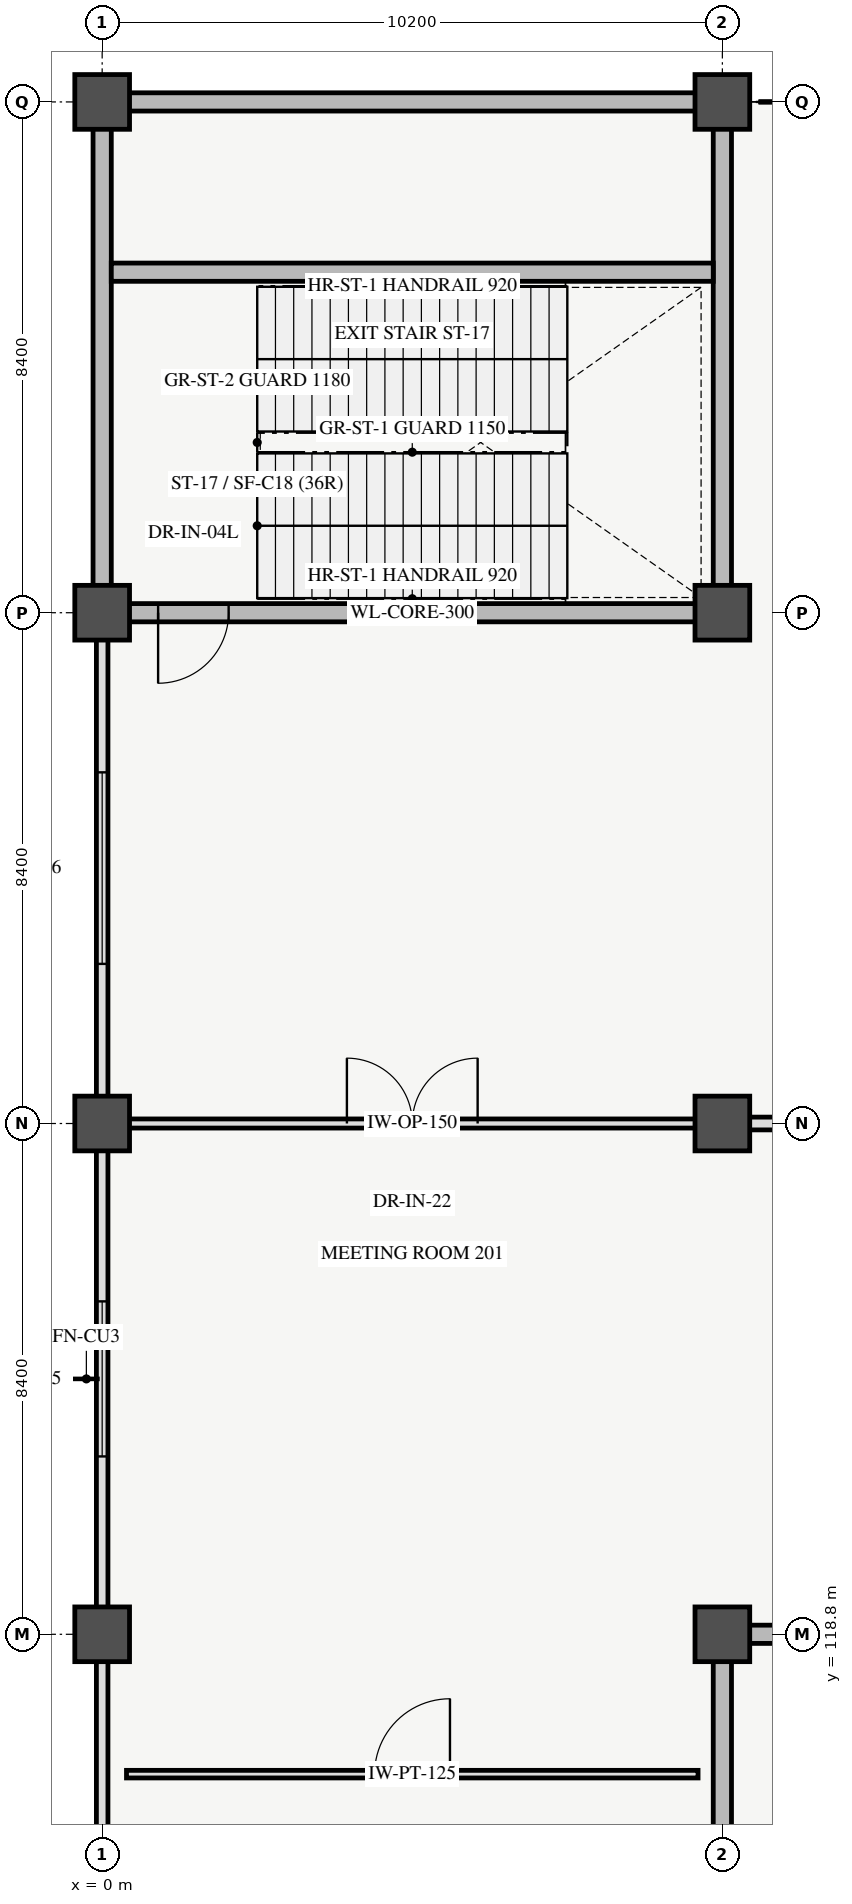
"""IFC4 building model, lengths in metres.
Left out: names, types, materials, properties, quantities, classifications, styles, units other than length and angle.
Written with IfcOpenShell. Run it as: python <this file> out.ifc"""

import sys

from ifc_helpers import new_model, si_unit, direction, frame, frame_2d, origin, origin_2d, place, context, subcontext, project, spatial, rectangle, extrude, element, fill, save


model = new_model("IFC4")
c1 = context("Model", 3, precision=1e-05, world=origin(), true_north=direction((0.0, 1.0)))
c2 = subcontext(c1, "Body", "Model", "MODEL_VIEW")
j1 = project(units=[si_unit("LENGTHUNIT", "METRE"), si_unit("PLANEANGLEUNIT", "RADIAN")], contexts=[c1])
p1 = place(None, origin())
s1 = spatial("IfcSite", under=j1, at=p1, CompositionType="ELEMENT")
p2 = place(p1, origin())
s2 = spatial("IfcBuilding", under=s1, at=p2, CompositionType="ELEMENT")
p3 = place(p2, frame((0.0, 0.0, 5.4)))
s3 = spatial("IfcBuildingStorey", under=s2, at=p3, CompositionType="ELEMENT", Elevation=5.4)
for number, where, z_axis, x_axis in (
    (1, (0.0, 118.8, 0.0), (0.0, 0.0, 1.0), (1.0, 0.0, 0.0)),
    (2, (0.0, 127.2, 0.0), (0.0, 0.0, 1.0), (1.0, 0.0, 0.0)),
    (3, (0.0, 135.6, 0.0), (0.0, 0.0, 1.0), (1.0, 0.0, 0.0)),
    (4, (0.0, 144.0, 0.0), (0.0, 0.0, 1.0), (1.0, 0.0, 0.0)),
    (5, (10.2, 118.8, 0.0), (0.0, 0.0, 1.0), (1.0, 0.0, 0.0)),
    (6, (10.2, 127.2, 0.0), (0.0, 0.0, 1.0), (1.0, 0.0, 0.0)),
    (7, (10.2, 135.6, 0.0), (0.0, 0.0, 1.0), (1.0, 0.0, 0.0)),
    (8, (10.2, 144.0, 0.0), (0.0, 0.0, 1.0), (1.0, 0.0, 0.0)),
):
    element("IfcColumn", number, at=place(p3, frame(where, z_axis=z_axis, x_axis=x_axis)), inside=s3, PredefinedType="COLUMN", context=c2, shape_type="SweptSolid", body=[
        extrude(rectangle(XDim=0.9, YDim=0.9, at=origin_2d()), origin(), (0.0, 0.0, 1.0), 5.4),
    ])
p4 = place(p3, frame((10.2, 118.8, 0.0), z_axis=(0.0, 0.0, 1.0), x_axis=(1.0, 0.0, 0.0)))
e9 = element("IfcWall", 9, at=p4, inside=s3, PredefinedType="SHEAR", context=c2, shape_type="SweptSolid", body=[
    extrude(rectangle(XDim=10.2, YDim=0.3, at=frame_2d((5.1, 0.0))), origin(), (0.0, 0.0, 1.0), 5.4),
])
p5 = place(p4, frame((1.2, 0.0, 0.0)))
e10 = element("IfcOpeningElement", 10, at=p5, cuts=e9, PredefinedType="OPENING", context=c2, shape_type="SweptSolid", body=[
    extrude(rectangle(XDim=1.16, YDim=2.2, at=frame_2d((0.58, 1.1))), frame((0.0, 0.16, 0.0), z_axis=(0.0, -1.0, 0.0), x_axis=(1.0, 0.0, 0.0)), (0.0, 0.0, 1.0), 0.32),
])
p6 = place(p4, frame((7.4, 0.0, 0.0)))
e11 = element("IfcOpeningElement", 11, at=p6, cuts=e9, PredefinedType="OPENING", context=c2, shape_type="SweptSolid", body=[
    extrude(rectangle(XDim=1.1, YDim=2.2, at=frame_2d((0.55, 1.1))), frame((0.0, 0.16, 0.0), z_axis=(0.0, -1.0, 0.0), x_axis=(1.0, 0.0, 0.0)), (0.0, 0.0, 1.0), 0.32),
])
p7 = place(p3, frame((10.2, 109.2, 0.0), z_axis=(0.0, 0.0, 1.0), x_axis=(0.0, 1.0, 0.0)))
e12 = element("IfcWall", 12, at=p7, inside=s3, PredefinedType="SHEAR", context=c2, shape_type="SweptSolid", body=[
    extrude(rectangle(XDim=9.6, YDim=0.3, at=frame_2d((4.8, 0.0))), origin(), (0.0, 0.0, 1.0), 5.4),
])
p8 = place(p3, frame((0.0, 109.44, 0.0), z_axis=(0.0, 0.0, 1.0), x_axis=(0.0, 1.0, 0.0)))
e13 = element("IfcWall", 13, at=p8, inside=s3, PredefinedType="STANDARD", context=c2, shape_type="SweptSolid", body=[
    extrude(rectangle(XDim=9.12, YDim=0.19, at=frame_2d((4.56, 0.0))), origin(), (0.0, 0.0, 1.0), 4.32),
])
p9 = place(p8, frame((3.585, 0.0, 0.9)))
e14 = element("IfcOpeningElement", 14, at=p9, cuts=e13, PredefinedType="OPENING", context=c2, shape_type="SweptSolid", body=[
    extrude(rectangle(XDim=1.95, YDim=1.65, at=frame_2d((0.975, 0.825))), frame((0.0, 0.105, 0.0), z_axis=(0.0, -1.0, 0.0), x_axis=(1.0, 0.0, 0.0)), (0.0, 0.0, 1.0), 0.21),
])
p10 = place(p3, frame((0.0, 119.04, 0.0), z_axis=(0.0, 0.0, 1.0), x_axis=(0.0, 1.0, 0.0)))
e15 = element("IfcWall", 15, at=p10, inside=s3, PredefinedType="STANDARD", context=c2, shape_type="SweptSolid", body=[
    extrude(rectangle(XDim=7.92, YDim=0.19, at=frame_2d((3.96, 0.0))), origin(), (0.0, 0.0, 1.0), 4.32),
])
p11 = place(p10, frame((2.685, 0.0, 0.9)))
e16 = element("IfcOpeningElement", 16, at=p11, cuts=e15, PredefinedType="OPENING", context=c2, shape_type="SweptSolid", body=[
    extrude(rectangle(XDim=2.55, YDim=2.25, at=frame_2d((1.275, 1.125))), frame((0.0, 0.105, 0.0), z_axis=(0.0, -1.0, 0.0), x_axis=(1.0, 0.0, 0.0)), (0.0, 0.0, 1.0), 0.21),
])
p12 = place(p3, frame((0.0, 127.44, 0.0), z_axis=(0.0, 0.0, 1.0), x_axis=(0.0, 1.0, 0.0)))
e17 = element("IfcWall", 17, at=p12, inside=s3, PredefinedType="STANDARD", context=c2, shape_type="SweptSolid", body=[
    extrude(rectangle(XDim=7.92, YDim=0.19, at=frame_2d((3.96, 0.0))), origin(), (0.0, 0.0, 1.0), 4.32),
])
p13 = place(p12, frame((2.385, 0.0, 0.9)))
e18 = element("IfcOpeningElement", 18, at=p13, cuts=e17, PredefinedType="OPENING", context=c2, shape_type="SweptSolid", body=[
    extrude(rectangle(XDim=3.15, YDim=2.25, at=frame_2d((1.575, 1.125))), frame((0.0, 0.105, 0.0), z_axis=(0.0, -1.0, 0.0), x_axis=(1.0, 0.0, 0.0)), (0.0, 0.0, 1.0), 0.21),
])
p14 = place(p3, frame((0.0, 135.6, 0.0), z_axis=(0.0, 0.0, 1.0), x_axis=(1.0, 0.0, 0.0)))
e19 = element("IfcWall", 19, at=p14, inside=s3, PredefinedType="SHEAR", context=c2, shape_type="SweptSolid", body=[
    extrude(rectangle(XDim=10.2, YDim=0.3, at=frame_2d((5.1, 0.0))), origin(), (0.0, 0.0, 1.0), 5.4),
])
p15 = place(p14, frame((0.92, 0.0, 0.0)))
e20 = element("IfcOpeningElement", 20, at=p15, cuts=e19, PredefinedType="OPENING", context=c2, shape_type="SweptSolid", body=[
    extrude(rectangle(XDim=1.16, YDim=2.2, at=frame_2d((0.58, 1.1))), frame((0.0, 0.16, 0.0), z_axis=(0.0, -1.0, 0.0), x_axis=(1.0, 0.0, 0.0)), (0.0, 0.0, 1.0), 0.32),
])
p16 = place(p3, frame((0.0, 144.0, 0.0), z_axis=(0.0, 0.0, 1.0), x_axis=(1.0, 0.0, 0.0)))
e21 = element("IfcWall", 21, at=p16, inside=s3, PredefinedType="SHEAR", context=c2, shape_type="SweptSolid", body=[
    extrude(rectangle(XDim=10.2, YDim=0.3, at=frame_2d((5.1, 0.0))), origin(), (0.0, 0.0, 1.0), 5.4),
])
for number, where, z_axis, x_axis in (
    (22, (0.0, 135.6, 0.0), (0.0, 0.0, 1.0), (0.0, 1.0, 0.0)),
    (23, (10.2, 135.6, 0.0), (0.0, 0.0, 1.0), (0.0, 1.0, 0.0)),
):
    element("IfcWall", number, at=place(p3, frame(where, z_axis=z_axis, x_axis=x_axis)), inside=s3, PredefinedType="SHEAR", context=c2, shape_type="SweptSolid", body=[
        extrude(rectangle(XDim=8.4, YDim=0.3, at=frame_2d((4.2, 0.0))), origin(), (0.0, 0.0, 1.0), 5.4),
    ])
p17 = place(p3, frame((0.15, 141.2, 0.0), z_axis=(0.0, 0.0, 1.0), x_axis=(1.0, 0.0, 0.0)))
e24 = element("IfcWall", 24, at=p17, inside=s3, PredefinedType="SHEAR", context=c2, shape_type="SweptSolid", body=[
    extrude(rectangle(XDim=9.9, YDim=0.3, at=frame_2d((4.95, 0.0))), origin(), (0.0, 0.0, 1.0), 5.4),
])
p18 = place(p3, frame((0.4, 127.2, 0.0), z_axis=(0.0, 0.0, 1.0), x_axis=(1.0, 0.0, 0.0)))
e25 = element("IfcWall", 25, at=p18, inside=s3, PredefinedType="MOVABLE", context=c2, shape_type="SweptSolid", body=[
    extrude(rectangle(XDim=9.4, YDim=0.15, at=frame_2d((4.7, 0.0))), origin(), (0.0, 0.0, 1.0), 4.2),
])
p19 = place(p18, frame((3.625, 0.0, 0.0)))
e26 = element("IfcOpeningElement", 26, at=p19, cuts=e25, PredefinedType="OPENING", context=c2, shape_type="SweptSolid", body=[
    extrude(rectangle(XDim=2.15, YDim=2.38, at=frame_2d((1.075, 1.19))), frame((0.0, 0.085, 0.0), z_axis=(0.0, -1.0, 0.0), x_axis=(1.0, 0.0, 0.0)), (0.0, 0.0, 1.0), 0.17),
])
p20 = place(p3, frame((10.6, 127.2, 0.0), z_axis=(0.0, 0.0, 1.0), x_axis=(1.0, 0.0, 0.0)))
e27 = element("IfcWall", 27, at=p20, inside=s3, PredefinedType="MOVABLE", context=c2, shape_type="SweptSolid", body=[
    extrude(rectangle(XDim=9.4, YDim=0.21, at=frame_2d((4.7, 0.0))), origin(), (0.0, 0.0, 1.0), 4.2),
])
p21 = place(p20, frame((3.95, 0.0, 0.0)))
e28 = element("IfcOpeningElement", 28, at=p21, cuts=e27, PredefinedType="OPENING", context=c2, shape_type="SweptSolid", body=[
    extrude(rectangle(XDim=1.5, YDim=2.25, at=frame_2d((0.75, 1.125))), frame((0.0, 0.115, 0.0), z_axis=(0.0, -1.0, 0.0), x_axis=(1.0, 0.0, 0.0)), (0.0, 0.0, 1.0), 0.23),
])
p22 = place(p3, frame((0.4, 116.5, 0.0), z_axis=(0.0, 0.0, 1.0), x_axis=(1.0, 0.0, 0.0)))
e29 = element("IfcWall", 29, at=p22, inside=s3, PredefinedType="PARTITIONING", context=c2, shape_type="SweptSolid", body=[
    extrude(rectangle(XDim=9.4, YDim=0.125, at=frame_2d((4.7, 0.0))), origin(), (0.0, 0.0, 1.0), 4.2),
])
p23 = place(p22, frame((4.08, 0.0, 0.0)))
e30 = element("IfcOpeningElement", 30, at=p23, cuts=e29, PredefinedType="OPENING", context=c2, shape_type="SweptSolid", body=[
    extrude(rectangle(XDim=1.24, YDim=2.2, at=frame_2d((0.62, 1.1))), frame((0.0, 0.073, 0.0), z_axis=(0.0, -1.0, 0.0), x_axis=(1.0, 0.0, 0.0)), (0.0, 0.0, 1.0), 0.145),
])
p24 = place(p11, origin())
e31 = element("IfcWindow", 31, at=p24, inside=s3, PartitioningType="DOUBLE_PANEL_VERTICAL", PredefinedType="WINDOW", context=c2, shape_type="SweptSolid", body=[
    extrude(rectangle(XDim=2.55, YDim=2.25, at=frame_2d((1.275, 1.125))), frame((0.0, 0.03, 0.0), z_axis=(0.0, -1.0, 0.0), x_axis=(1.0, 0.0, 0.0)), (0.0, 0.0, 1.0), 0.06),
])
fill(e16, e31)
p25 = place(p13, origin())
e32 = element("IfcWindow", 32, at=p25, inside=s3, PartitioningType="TRIPLE_PANEL_VERTICAL", PredefinedType="WINDOW", context=c2, shape_type="SweptSolid", body=[
    extrude(rectangle(XDim=3.15, YDim=2.25, at=frame_2d((1.575, 1.125))), frame((0.0, 0.03, 0.0), z_axis=(0.0, -1.0, 0.0), x_axis=(1.0, 0.0, 0.0)), (0.0, 0.0, 1.0), 0.06),
])
fill(e18, e32)
p26 = place(p15, origin())
e33 = element("IfcDoor", 33, at=p26, inside=s3, OperationType="SINGLE_SWING_LEFT", PredefinedType="DOOR", context=c2, shape_type="SweptSolid", body=[
    extrude(rectangle(XDim=1.16, YDim=2.2, at=frame_2d((0.58, 1.1))), frame((0.0, 0.025, 0.0), z_axis=(0.0, -1.0, 0.0), x_axis=(1.0, 0.0, 0.0)), (0.0, 0.0, 1.0), 0.05),
])
fill(e20, e33)
p27 = place(p19, origin())
e34 = element("IfcDoor", 34, at=p27, inside=s3, OperationType="DOUBLE_DOOR_SINGLE_SWING", PredefinedType="DOOR", context=c2, shape_type="SweptSolid", body=[
    extrude(rectangle(XDim=2.15, YDim=2.38, at=frame_2d((1.075, 1.19))), frame((0.0, 0.025, 0.0), z_axis=(0.0, -1.0, 0.0), x_axis=(1.0, 0.0, 0.0)), (0.0, 0.0, 1.0), 0.05),
])
fill(e26, e34)
p28 = place(p23, origin())
e35 = element("IfcDoor", 35, at=p28, inside=s3, OperationType="SINGLE_SWING_RIGHT", PredefinedType="DOOR", context=c2, shape_type="SweptSolid", body=[
    extrude(rectangle(XDim=1.24, YDim=2.2, at=frame_2d((0.62, 1.1))), frame((0.0, 0.025, 0.0), z_axis=(0.0, -1.0, 0.0), x_axis=(1.0, 0.0, 0.0)), (0.0, 0.0, 1.0), 0.05),
])
fill(e30, e35)
save(model, sys.argv[1])
